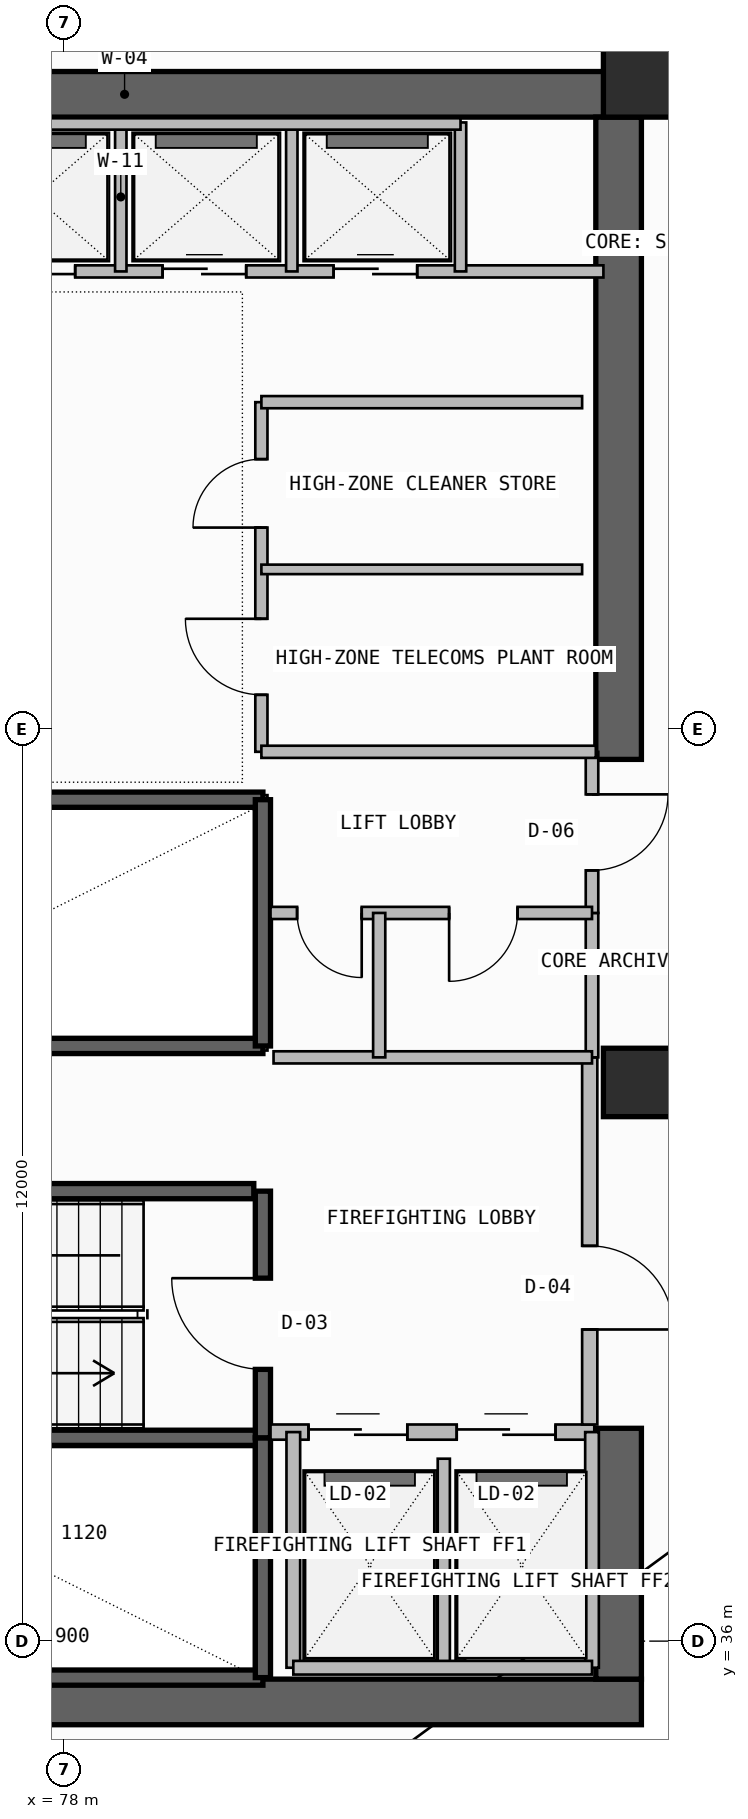
"""IFC4 building model, lengths in metres.
Left out: names, types, materials, properties, quantities, classifications, styles, units other than length and angle.
Written with IfcOpenShell. Run it as: python <this file> out.ifc"""

import sys

from ifc_helpers import new_model, si_unit, direction, frame, frame_2d, origin, origin_2d, place, context, subcontext, project, spatial, rectangle, extrude, element, fill, save


model = new_model("IFC4")
c1 = context("Model", 3, precision=1e-05, world=origin(), true_north=direction((0.0, 1.0)))
c2 = subcontext(c1, "Body", "Model", "MODEL_VIEW")
j1 = project(units=[si_unit("LENGTHUNIT", "METRE"), si_unit("PLANEANGLEUNIT", "RADIAN")], contexts=[c1])
p1 = place(None, origin())
s1 = spatial("IfcSite", under=j1, at=p1, CompositionType="ELEMENT")
p2 = place(p1, origin())
s2 = spatial("IfcBuilding", under=s1, at=p2, CompositionType="ELEMENT")
p3 = place(p2, frame((0.0, 0.0, 246.66)))
s3 = spatial("IfcBuildingStorey", under=s2, at=p3, CompositionType="ELEMENT", Elevation=246.66)
p4 = place(p3, frame((72.3, 35.2, -0.26), z_axis=(0.0, 0.0, 1.0), x_axis=(1.0, 0.0, 0.0)))
e1 = element("IfcWall", 1, at=p4, inside=s3, PredefinedType="SHEAR", context=c2, shape_type="SweptSolid", body=[
    extrude(rectangle(XDim=13.3, YDim=0.6, at=frame_2d((6.65, 0.0))), origin(), (0.0, 0.0, 1.0), 3.52),
])
p5 = place(p3, frame((85.3, 35.5, -0.26), z_axis=(0.0, 0.0, 1.0), x_axis=(0.0, 1.0, 0.0)))
e2 = element("IfcWall", 2, at=p5, inside=s3, PredefinedType="SHEAR", context=c2, shape_type="SweptSolid", body=[
    extrude(rectangle(XDim=3.3, YDim=0.6, at=frame_2d((1.65, 0.0))), origin(), (0.0, 0.0, 1.0), 3.52),
])
p6 = place(p3, frame((72.0, 56.35, -0.26), z_axis=(0.0, 0.0, 1.0), x_axis=(1.0, 0.0, 0.0)))
e3 = element("IfcWall", 3, at=p6, inside=s3, PredefinedType="SHEAR", context=c2, shape_type="SweptSolid", body=[
    extrude(rectangle(XDim=13.6, YDim=0.6, at=frame_2d((6.8, 0.0))), origin(), (0.0, 0.0, 1.0), 3.52),
])
p7 = place(p3, frame((85.3, 47.6, -0.26), z_axis=(0.0, 0.0, 1.0), x_axis=(0.0, 1.0, 0.0)))
e4 = element("IfcWall", 4, at=p7, inside=s3, PredefinedType="SHEAR", context=c2, shape_type="SweptSolid", body=[
    extrude(rectangle(XDim=8.45, YDim=0.6, at=frame_2d((4.225, 0.0))), origin(), (0.0, 0.0, 1.0), 3.52),
])
for number, where, z_axis, x_axis in (
    (5, (85.55, 43.35, 0.0), (0.0, 0.0, 1.0), (1.0, 0.0, 0.0)),
    (6, (85.55, 56.5, 0.0), (0.0, 0.0, 1.0), (1.0, 0.0, 0.0)),
):
    element("IfcColumn", number, at=place(p3, frame(where, z_axis=z_axis, x_axis=x_axis)), inside=s3, PredefinedType="COLUMN", context=c2, shape_type="SweptSolid", body=[
        extrude(rectangle(XDim=0.9, YDim=0.9, at=origin_2d()), origin(), (0.0, 0.0, 1.0), 3.52),
    ])
for number, where, z_axis, x_axis in (
    (7, (72.92, 35.52, -0.26), (0.0, 0.0, 1.0), (1.0, 0.0, 0.0)),
    (8, (72.92, 38.675, -0.26), (0.0, 0.0, 1.0), (1.0, 0.0, 0.0)),
):
    element("IfcWall", number, at=place(p3, frame(where, z_axis=z_axis, x_axis=x_axis)), inside=s3, PredefinedType="SOLIDWALL", context=c2, shape_type="SweptSolid", body=[
        extrude(rectangle(XDim=7.7, YDim=0.2, at=frame_2d((3.85, 0.0))), origin(), (0.0, 0.0, 1.0), 3.52),
    ])
p8 = place(p3, frame((80.62, 35.52, -0.26), z_axis=(0.0, 0.0, 1.0), x_axis=(0.0, 1.0, 0.0)))
e9 = element("IfcWall", 9, at=p8, inside=s3, PredefinedType="SOLIDWALL", context=c2, shape_type="SweptSolid", body=[
    extrude(rectangle(XDim=3.155, YDim=0.2, at=frame_2d((1.578, 0.0))), origin(), (0.0, 0.0, 1.0), 3.52),
])
p9 = place(p3, frame((80.62, 38.675, -0.26), z_axis=(0.0, 0.0, 1.0), x_axis=(0.0, 1.0, 0.0)))
e10 = element("IfcWall", 10, at=p9, inside=s3, PredefinedType="SOLIDWALL", context=c2, shape_type="SweptSolid", body=[
    extrude(rectangle(XDim=3.245, YDim=0.2, at=frame_2d((1.623, 0.0))), origin(), (0.0, 0.0, 1.0), 3.52),
])
p10 = place(p9, frame((0.9, 0.0, 0.26)))
e11 = element("IfcOpeningElement", 11, at=p10, cuts=e10, PredefinedType="OPENING", context=c2, shape_type="SweptSolid", body=[
    extrude(rectangle(XDim=1.2, YDim=2.2, at=frame_2d((0.6, 1.1))), frame((0.0, 0.11, 0.0), z_axis=(0.0, -1.0, 0.0), x_axis=(1.0, 0.0, 0.0)), (0.0, 0.0, 1.0), 0.22),
])
p11 = place(p3, frame((80.72, 38.75, 0.0), z_axis=(0.0, 0.0, 1.0), x_axis=(1.0, 0.0, 0.0)))
e12 = element("IfcWall", 12, at=p11, inside=s3, PredefinedType="SOLIDWALL", context=c2, shape_type="SweptSolid", body=[
    extrude(rectangle(XDim=4.26, YDim=0.2, at=frame_2d((2.13, 0.0))), origin(), (0.0, 0.0, 1.0), 3.26),
])
p12 = place(p11, frame((0.5, 0.0, 0.0)))
e13 = element("IfcOpeningElement", 13, at=p12, cuts=e12, PredefinedType="OPENING", context=c2, shape_type="SweptSolid", body=[
    extrude(rectangle(XDim=1.3, YDim=2.3, at=frame_2d((0.65, 1.15))), frame((0.0, 0.11, 0.0), z_axis=(0.0, -1.0, 0.0), x_axis=(1.0, 0.0, 0.0)), (0.0, 0.0, 1.0), 0.22),
])
p13 = place(p11, frame((2.45, 0.0, 0.0)))
e14 = element("IfcOpeningElement", 14, at=p13, cuts=e12, PredefinedType="OPENING", context=c2, shape_type="SweptSolid", body=[
    extrude(rectangle(XDim=1.3, YDim=2.3, at=frame_2d((0.65, 1.15))), frame((0.0, 0.11, 0.0), z_axis=(0.0, -1.0, 0.0), x_axis=(1.0, 0.0, 0.0)), (0.0, 0.0, 1.0), 0.22),
])
p14 = place(p3, frame((83.0, 35.65, 0.0), z_axis=(0.0, 0.0, 1.0), x_axis=(0.0, 1.0, 0.0)))
e15 = element("IfcWall", 15, at=p14, inside=s3, PredefinedType="PLUMBINGWALL", context=c2, shape_type="SweptSolid", body=[
    extrude(rectangle(XDim=2.75, YDim=0.16, at=frame_2d((1.375, 0.0))), origin(), (0.0, 0.0, 1.0), 3.26),
])
for number, where, z_axis, x_axis in (
    (16, (84.95, 35.65, 0.0), (0.0, 0.0, 1.0), (0.0, 1.0, 0.0)),
    (17, (81.02, 35.65, 0.0), (0.0, 0.0, 1.0), (0.0, 1.0, 0.0)),
):
    element("IfcWall", number, at=place(p3, frame(where, z_axis=z_axis, x_axis=x_axis)), inside=s3, PredefinedType="SOLIDWALL", context=c2, shape_type="SweptSolid", body=[
        extrude(rectangle(XDim=3.1, YDim=0.18, at=frame_2d((1.55, 0.0))), origin(), (0.0, 0.0, 1.0), 3.26),
    ])
p15 = place(p3, frame((81.02, 35.65, 0.0), z_axis=(0.0, 0.0, 1.0), x_axis=(1.0, 0.0, 0.0)))
e18 = element("IfcWall", 18, at=p15, inside=s3, PredefinedType="SOLIDWALL", context=c2, shape_type="SweptSolid", body=[
    extrude(rectangle(XDim=3.93, YDim=0.18, at=frame_2d((1.965, 0.0))), origin(), (0.0, 0.0, 1.0), 3.26),
])
p16 = place(p3, frame((84.92, 38.85, 0.0), z_axis=(0.0, 0.0, 1.0), x_axis=(0.0, 1.0, 0.0)))
e19 = element("IfcWall", 19, at=p16, inside=s3, PredefinedType="SOLIDWALL", context=c2, shape_type="SweptSolid", body=[
    extrude(rectangle(XDim=4.83, YDim=0.2, at=frame_2d((2.415, 0.0))), origin(), (0.0, 0.0, 1.0), 3.26),
])
p17 = place(p16, frame((1.25, 0.0, 0.0)))
e20 = element("IfcOpeningElement", 20, at=p17, cuts=e19, PredefinedType="OPENING", context=c2, shape_type="SweptSolid", body=[
    extrude(rectangle(XDim=1.1, YDim=2.2, at=frame_2d((0.55, 1.1))), frame((0.0, 0.11, 0.0), z_axis=(0.0, -1.0, 0.0), x_axis=(1.0, 0.0, 0.0)), (0.0, 0.0, 1.0), 0.22),
])
p18 = place(p3, frame((72.92, 41.92, -0.26), z_axis=(0.0, 0.0, 1.0), x_axis=(1.0, 0.0, 0.0)))
e21 = element("IfcWall", 21, at=p18, inside=s3, PredefinedType="SOLIDWALL", context=c2, shape_type="SweptSolid", body=[
    extrude(rectangle(XDim=7.58, YDim=0.2, at=frame_2d((3.79, 0.0))), origin(), (0.0, 0.0, 1.0), 3.52),
])
for number, where, z_axis, x_axis in (
    (22, (72.92, 43.83, -0.26), (0.0, 0.0, 1.0), (1.0, 0.0, 0.0)),
    (23, (72.92, 47.07, -0.26), (0.0, 0.0, 1.0), (1.0, 0.0, 0.0)),
):
    element("IfcWall", number, at=place(p3, frame(where, z_axis=z_axis, x_axis=x_axis)), inside=s3, PredefinedType="SOLIDWALL", context=c2, shape_type="SweptSolid", body=[
        extrude(rectangle(XDim=7.7, YDim=0.2, at=frame_2d((3.85, 0.0))), origin(), (0.0, 0.0, 1.0), 3.52),
    ])
p19 = place(p3, frame((80.62, 43.83, -0.26), z_axis=(0.0, 0.0, 1.0), x_axis=(0.0, 1.0, 0.0)))
e24 = element("IfcWall", 24, at=p19, inside=s3, PredefinedType="SOLIDWALL", context=c2, shape_type="SweptSolid", body=[
    extrude(rectangle(XDim=3.24, YDim=0.2, at=frame_2d((1.62, 0.0))), origin(), (0.0, 0.0, 1.0), 3.52),
])
p20 = place(p3, frame((84.95, 43.68, 0.0), z_axis=(0.0, 0.0, 1.0), x_axis=(0.0, 1.0, 0.0)))
e25 = element("IfcWall", 25, at=p20, inside=s3, PredefinedType="PLUMBINGWALL", context=c2, shape_type="SweptSolid", body=[
    extrude(rectangle(XDim=1.9, YDim=0.165, at=frame_2d((0.95, 0.0))), origin(), (0.0, 0.0, 1.0), 3.26),
])
p21 = place(p3, frame((84.95, 45.58, 0.0), z_axis=(0.0, 0.0, 1.0), x_axis=(0.0, 1.0, 0.0)))
e26 = element("IfcWall", 26, at=p21, inside=s3, PredefinedType="PARTITIONING", context=c2, shape_type="SweptSolid", body=[
    extrude(rectangle(XDim=2.12, YDim=0.165, at=frame_2d((1.06, 0.0))), origin(), (0.0, 0.0, 1.0), 3.26),
])
p22 = place(p21, frame((0.56, 0.0, 0.0)))
e27 = element("IfcOpeningElement", 27, at=p22, cuts=e26, PredefinedType="OPENING", context=c2, shape_type="SweptSolid", body=[
    extrude(rectangle(XDim=1.0, YDim=2.2, at=frame_2d((0.5, 1.1))), frame((0.0, 0.093, 0.0), z_axis=(0.0, -1.0, 0.0), x_axis=(1.0, 0.0, 0.0)), (0.0, 0.0, 1.0), 0.185),
])
p23 = place(p3, frame((80.72, 45.58, 0.0), z_axis=(0.0, 0.0, 1.0), x_axis=(1.0, 0.0, 0.0)))
e28 = element("IfcWall", 28, at=p23, inside=s3, PredefinedType="PLUMBINGWALL", context=c2, shape_type="SweptSolid", body=[
    extrude(rectangle(XDim=4.23, YDim=0.16, at=frame_2d((2.115, 0.0))), origin(), (0.0, 0.0, 1.0), 3.26),
])
p24 = place(p23, frame((0.35, 0.0, 0.0)))
e29 = element("IfcOpeningElement", 29, at=p24, cuts=e28, PredefinedType="OPENING", context=c2, shape_type="SweptSolid", body=[
    extrude(rectangle(XDim=0.85, YDim=2.05, at=frame_2d((0.425, 1.025))), frame((0.0, 0.09, 0.0), z_axis=(0.0, -1.0, 0.0), x_axis=(1.0, 0.0, 0.0)), (0.0, 0.0, 1.0), 0.18),
])
p25 = place(p23, frame((2.35, 0.0, 0.0)))
e30 = element("IfcOpeningElement", 30, at=p25, cuts=e28, PredefinedType="OPENING", context=c2, shape_type="SweptSolid", body=[
    extrude(rectangle(XDim=0.9, YDim=2.1, at=frame_2d((0.45, 1.05))), frame((0.0, 0.09, 0.0), z_axis=(0.0, -1.0, 0.0), x_axis=(1.0, 0.0, 0.0)), (0.0, 0.0, 1.0), 0.18),
])
p26 = place(p3, frame((80.76, 43.68, 0.0), z_axis=(0.0, 0.0, 1.0), x_axis=(1.0, 0.0, 0.0)))
e31 = element("IfcWall", 31, at=p26, inside=s3, PredefinedType="PLUMBINGWALL", context=c2, shape_type="SweptSolid", body=[
    extrude(rectangle(XDim=4.19, YDim=0.16, at=frame_2d((2.095, 0.0))), origin(), (0.0, 0.0, 1.0), 3.26),
])
p27 = place(p3, frame((82.15, 43.68, 0.0), z_axis=(0.0, 0.0, 1.0), x_axis=(0.0, 1.0, 0.0)))
e32 = element("IfcWall", 32, at=p27, inside=s3, PredefinedType="PLUMBINGWALL", context=c2, shape_type="SweptSolid", body=[
    extrude(rectangle(XDim=1.9, YDim=0.16, at=frame_2d((0.95, 0.0))), origin(), (0.0, 0.0, 1.0), 3.26),
])
p28 = place(p3, frame((80.6, 47.7, 0.0), z_axis=(0.0, 0.0, 1.0), x_axis=(0.0, 1.0, 0.0)))
e33 = element("IfcWall", 33, at=p28, inside=s3, PredefinedType="SOLIDWALL", context=c2, shape_type="SweptSolid", body=[
    extrude(rectangle(XDim=4.6, YDim=0.16, at=frame_2d((2.3, 0.0))), origin(), (0.0, 0.0, 1.0), 3.26),
])
p29 = place(p28, frame((0.75, 0.0, 0.0)))
e34 = element("IfcOpeningElement", 34, at=p29, cuts=e33, PredefinedType="OPENING", context=c2, shape_type="SweptSolid", body=[
    extrude(rectangle(XDim=1.0, YDim=2.2, at=frame_2d((0.5, 1.1))), frame((0.0, 0.09, 0.0), z_axis=(0.0, -1.0, 0.0), x_axis=(1.0, 0.0, 0.0)), (0.0, 0.0, 1.0), 0.18),
])
p30 = place(p28, frame((2.95, 0.0, 0.0)))
e35 = element("IfcOpeningElement", 35, at=p30, cuts=e33, PredefinedType="OPENING", context=c2, shape_type="SweptSolid", body=[
    extrude(rectangle(XDim=0.9, YDim=2.1, at=frame_2d((0.45, 1.05))), frame((0.0, 0.09, 0.0), z_axis=(0.0, -1.0, 0.0), x_axis=(1.0, 0.0, 0.0)), (0.0, 0.0, 1.0), 0.18),
])
p31 = place(p3, frame((80.6, 47.7, 0.0), z_axis=(0.0, 0.0, 1.0), x_axis=(1.0, 0.0, 0.0)))
e36 = element("IfcWall", 36, at=p31, inside=s3, PredefinedType="SOLIDWALL", context=c2, shape_type="SweptSolid", body=[
    extrude(rectangle(XDim=4.4, YDim=0.16, at=frame_2d((2.2, 0.0))), origin(), (0.0, 0.0, 1.0), 3.26),
])
p32 = place(p3, frame((80.6, 52.3, 0.0), z_axis=(0.0, 0.0, 1.0), x_axis=(1.0, 0.0, 0.0)))
e37 = element("IfcWall", 37, at=p32, inside=s3, PredefinedType="SOLIDWALL", context=c2, shape_type="SweptSolid", body=[
    extrude(rectangle(XDim=4.22, YDim=0.16, at=frame_2d((2.11, 0.0))), origin(), (0.0, 0.0, 1.0), 3.26),
])
p33 = place(p3, frame((80.6, 50.1, 0.0), z_axis=(0.0, 0.0, 1.0), x_axis=(1.0, 0.0, 0.0)))
e38 = element("IfcWall", 38, at=p33, inside=s3, PredefinedType="PARTITIONING", context=c2, shape_type="SweptSolid", body=[
    extrude(rectangle(XDim=4.22, YDim=0.125, at=frame_2d((2.11, 0.0))), origin(), (0.0, 0.0, 1.0), 3.26),
])
p34 = place(p3, frame((73.02, 54.02, 0.0), z_axis=(0.0, 0.0, 1.0), x_axis=(1.0, 0.0, 0.0)))
e39 = element("IfcWall", 39, at=p34, inside=s3, PredefinedType="SOLIDWALL", context=c2, shape_type="SweptSolid", body=[
    extrude(rectangle(XDim=12.08, YDim=0.16, at=frame_2d((6.04, 0.0))), origin(), (0.0, 0.0, 1.0), 3.26),
])
p35 = place(p34, frame((4.03, 0.0, 0.0)))
e40 = element("IfcOpeningElement", 40, at=p35, cuts=e39, PredefinedType="OPENING", context=c2, shape_type="SweptSolid", body=[
    extrude(rectangle(XDim=1.1, YDim=2.25, at=frame_2d((0.55, 1.125))), frame((0.0, 0.09, 0.0), z_axis=(0.0, -1.0, 0.0), x_axis=(1.0, 0.0, 0.0)), (0.0, 0.0, 1.0), 0.18),
])
p36 = place(p34, frame((6.28, 0.0, 0.0)))
e41 = element("IfcOpeningElement", 41, at=p36, cuts=e39, PredefinedType="OPENING", context=c2, shape_type="SweptSolid", body=[
    extrude(rectangle(XDim=1.1, YDim=2.25, at=frame_2d((0.55, 1.125))), frame((0.0, 0.09, 0.0), z_axis=(0.0, -1.0, 0.0), x_axis=(1.0, 0.0, 0.0)), (0.0, 0.0, 1.0), 0.18),
])
p37 = place(p34, frame((8.53, 0.0, 0.0)))
e42 = element("IfcOpeningElement", 42, at=p37, cuts=e39, PredefinedType="OPENING", context=c2, shape_type="SweptSolid", body=[
    extrude(rectangle(XDim=1.1, YDim=2.25, at=frame_2d((0.55, 1.125))), frame((0.0, 0.09, 0.0), z_axis=(0.0, -1.0, 0.0), x_axis=(1.0, 0.0, 0.0)), (0.0, 0.0, 1.0), 0.18),
])
for number, where, z_axis, x_axis in (
    (43, (78.75, 54.02, 0.0), (0.0, 0.0, 1.0), (0.0, 1.0, 0.0)),
    (44, (81.0, 54.02, 0.0), (0.0, 0.0, 1.0), (0.0, 1.0, 0.0)),
):
    element("IfcWall", number, at=place(p3, frame(where, z_axis=z_axis, x_axis=x_axis)), inside=s3, PredefinedType="PLUMBINGWALL", context=c2, shape_type="SweptSolid", body=[
        extrude(rectangle(XDim=1.96, YDim=0.15, at=frame_2d((0.98, 0.0))), origin(), (0.0, 0.0, 1.0), 3.26),
    ])
p38 = place(p3, frame((83.22, 54.02, 0.0), z_axis=(0.0, 0.0, 1.0), x_axis=(0.0, 1.0, 0.0)))
e45 = element("IfcWall", 45, at=p38, inside=s3, PredefinedType="SOLIDWALL", context=c2, shape_type="SweptSolid", body=[
    extrude(rectangle(XDim=1.96, YDim=0.15, at=frame_2d((0.98, 0.0))), origin(), (0.0, 0.0, 1.0), 3.26),
])
p39 = place(p3, frame((76.52, 55.96, 0.0), z_axis=(0.0, 0.0, 1.0), x_axis=(1.0, 0.0, 0.0)))
e46 = element("IfcWall", 46, at=p39, inside=s3, PredefinedType="SOLIDWALL", context=c2, shape_type="SweptSolid", body=[
    extrude(rectangle(XDim=6.7, YDim=0.15, at=frame_2d((3.35, 0.0))), origin(), (0.0, 0.0, 1.0), 3.26),
])
p40 = place(p10, origin())
e47 = element("IfcDoor", 47, at=p40, inside=s3, OperationType="SINGLE_SWING_RIGHT", PredefinedType="USERDEFINED", context=c2, shape_type="SweptSolid", body=[
    extrude(rectangle(XDim=1.2, YDim=2.2, at=frame_2d((0.6, 1.1))), frame((0.0, 0.025, 0.0), z_axis=(0.0, -1.0, 0.0), x_axis=(1.0, 0.0, 0.0)), (0.0, 0.0, 1.0), 0.05),
])
fill(e11, e47)
p41 = place(p12, origin())
e48 = element("IfcDoor", 48, at=p41, inside=s3, OperationType="DOUBLE_DOOR_SLIDING", PredefinedType="DOOR", context=c2, shape_type="SweptSolid", body=[
    extrude(rectangle(XDim=1.3, YDim=2.3, at=frame_2d((0.65, 1.15))), frame((0.0, 0.025, 0.0), z_axis=(0.0, -1.0, 0.0), x_axis=(1.0, 0.0, 0.0)), (0.0, 0.0, 1.0), 0.05),
])
fill(e13, e48)
p42 = place(p13, origin())
e49 = element("IfcDoor", 49, at=p42, inside=s3, OperationType="DOUBLE_DOOR_SLIDING", PredefinedType="DOOR", context=c2, shape_type="SweptSolid", body=[
    extrude(rectangle(XDim=1.3, YDim=2.3, at=frame_2d((0.65, 1.15))), frame((0.0, 0.025, 0.0), z_axis=(0.0, -1.0, 0.0), x_axis=(1.0, 0.0, 0.0)), (0.0, 0.0, 1.0), 0.05),
])
fill(e14, e49)
p43 = place(p17, frame((1.1, 0.0, 0.0), z_axis=(0.0, 0.0, 1.0), x_axis=(-1.0, 0.0, 0.0)))
e50 = element("IfcDoor", 50, at=p43, inside=s3, OperationType="SINGLE_SWING_RIGHT", PredefinedType="DOOR", context=c2, shape_type="SweptSolid", body=[
    extrude(rectangle(XDim=1.1, YDim=2.2, at=frame_2d((0.55, 1.1))), frame((0.0, 0.025, 0.0), z_axis=(0.0, -1.0, 0.0), x_axis=(1.0, 0.0, 0.0)), (0.0, 0.0, 1.0), 0.05),
])
fill(e20, e50)
p44 = place(p22, frame((1.0, 0.0, 0.0), z_axis=(0.0, 0.0, 1.0), x_axis=(-1.0, 0.0, 0.0)))
e51 = element("IfcDoor", 51, at=p44, inside=s3, OperationType="SINGLE_SWING_LEFT", PredefinedType="DOOR", context=c2, shape_type="SweptSolid", body=[
    extrude(rectangle(XDim=1.0, YDim=2.2, at=frame_2d((0.5, 1.1))), frame((0.0, 0.025, 0.0), z_axis=(0.0, -1.0, 0.0), x_axis=(1.0, 0.0, 0.0)), (0.0, 0.0, 1.0), 0.05),
])
fill(e27, e51)
p45 = place(p24, frame((0.85, 0.0, 0.0), z_axis=(0.0, 0.0, 1.0), x_axis=(-1.0, 0.0, 0.0)))
e52 = element("IfcDoor", 52, at=p45, inside=s3, OperationType="SINGLE_SWING_LEFT", PredefinedType="DOOR", context=c2, shape_type="SweptSolid", body=[
    extrude(rectangle(XDim=0.85, YDim=2.05, at=frame_2d((0.425, 1.025))), frame((0.0, 0.025, 0.0), z_axis=(0.0, -1.0, 0.0), x_axis=(1.0, 0.0, 0.0)), (0.0, 0.0, 1.0), 0.05),
])
fill(e29, e52)
p46 = place(p25, frame((0.9, 0.0, 0.0), z_axis=(0.0, 0.0, 1.0), x_axis=(-1.0, 0.0, 0.0)))
e53 = element("IfcDoor", 53, at=p46, inside=s3, OperationType="SINGLE_SWING_RIGHT", PredefinedType="DOOR", context=c2, shape_type="SweptSolid", body=[
    extrude(rectangle(XDim=0.9, YDim=2.1, at=frame_2d((0.45, 1.05))), frame((0.0, 0.025, 0.0), z_axis=(0.0, -1.0, 0.0), x_axis=(1.0, 0.0, 0.0)), (0.0, 0.0, 1.0), 0.05),
])
fill(e30, e53)
p47 = place(p29, origin())
e54 = element("IfcDoor", 54, at=p47, inside=s3, OperationType="SINGLE_SWING_RIGHT", PredefinedType="DOOR", context=c2, shape_type="SweptSolid", body=[
    extrude(rectangle(XDim=1.0, YDim=2.2, at=frame_2d((0.5, 1.1))), frame((0.0, 0.025, 0.0), z_axis=(0.0, -1.0, 0.0), x_axis=(1.0, 0.0, 0.0)), (0.0, 0.0, 1.0), 0.05),
])
fill(e34, e54)
p48 = place(p30, origin())
e55 = element("IfcDoor", 55, at=p48, inside=s3, OperationType="SINGLE_SWING_LEFT", PredefinedType="DOOR", context=c2, shape_type="SweptSolid", body=[
    extrude(rectangle(XDim=0.9, YDim=2.1, at=frame_2d((0.45, 1.05))), frame((0.0, 0.025, 0.0), z_axis=(0.0, -1.0, 0.0), x_axis=(1.0, 0.0, 0.0)), (0.0, 0.0, 1.0), 0.05),
])
fill(e35, e55)
p49 = place(p35, origin())
e56 = element("IfcDoor", 56, at=p49, inside=s3, OperationType="DOUBLE_DOOR_SLIDING", PredefinedType="DOOR", context=c2, shape_type="SweptSolid", body=[
    extrude(rectangle(XDim=1.1, YDim=2.25, at=frame_2d((0.55, 1.125))), frame((0.0, 0.025, 0.0), z_axis=(0.0, -1.0, 0.0), x_axis=(1.0, 0.0, 0.0)), (0.0, 0.0, 1.0), 0.05),
])
fill(e40, e56)
p50 = place(p36, origin())
e57 = element("IfcDoor", 57, at=p50, inside=s3, OperationType="DOUBLE_DOOR_SLIDING", PredefinedType="DOOR", context=c2, shape_type="SweptSolid", body=[
    extrude(rectangle(XDim=1.1, YDim=2.25, at=frame_2d((0.55, 1.125))), frame((0.0, 0.025, 0.0), z_axis=(0.0, -1.0, 0.0), x_axis=(1.0, 0.0, 0.0)), (0.0, 0.0, 1.0), 0.05),
])
fill(e41, e57)
p51 = place(p37, origin())
e58 = element("IfcDoor", 58, at=p51, inside=s3, OperationType="DOUBLE_DOOR_SLIDING", PredefinedType="DOOR", context=c2, shape_type="SweptSolid", body=[
    extrude(rectangle(XDim=1.1, YDim=2.25, at=frame_2d((0.55, 1.125))), frame((0.0, 0.025, 0.0), z_axis=(0.0, -1.0, 0.0), x_axis=(1.0, 0.0, 0.0)), (0.0, 0.0, 1.0), 0.05),
])
fill(e42, e58)
save(model, sys.argv[1])
